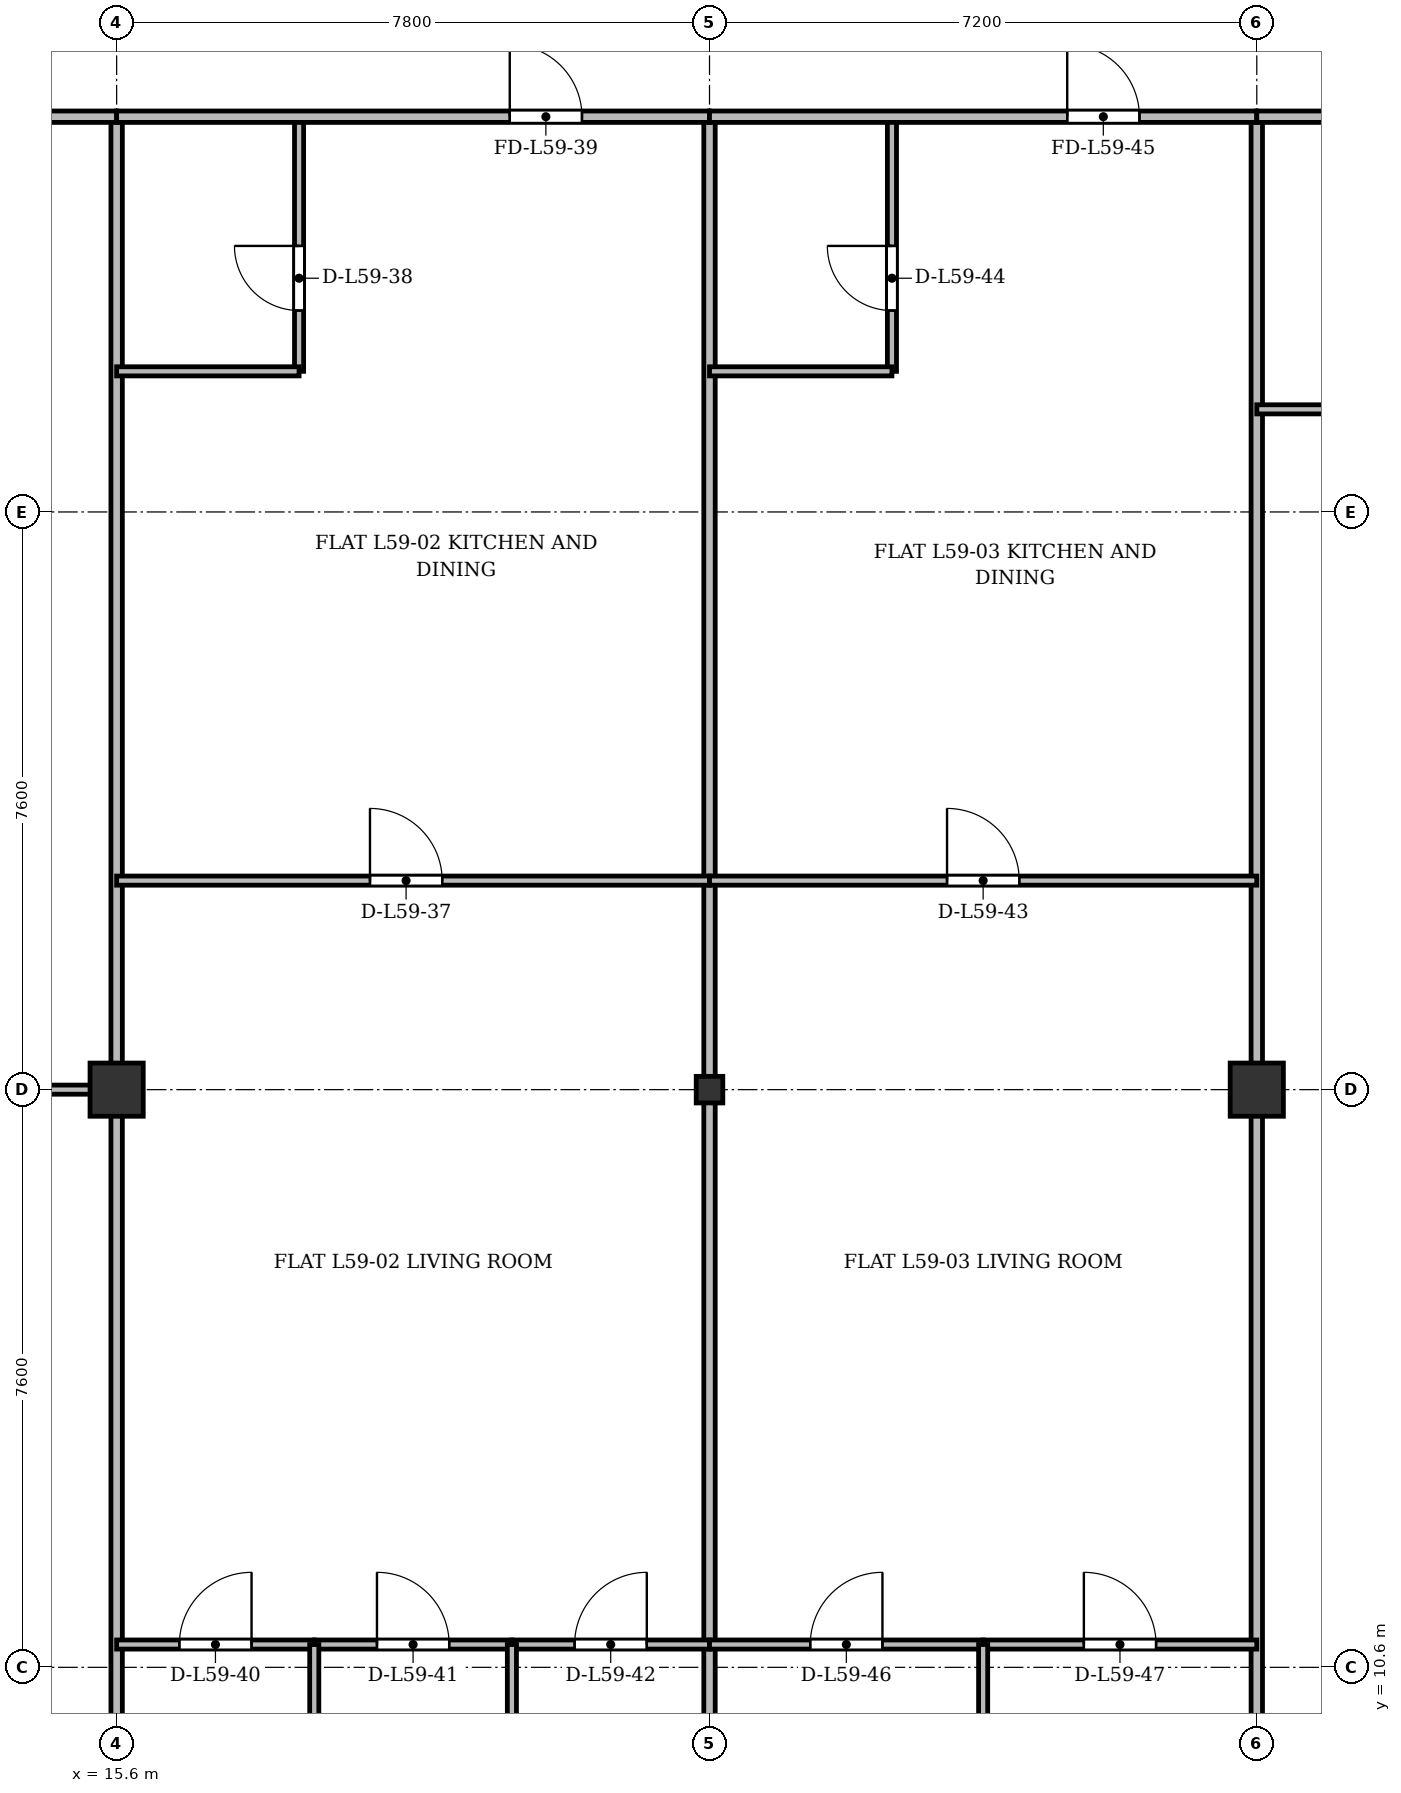
"""IFC4 building model, lengths in metres.
Left out: names, types, materials, properties, quantities, classifications, styles, units other than length and angle.
Written with IfcOpenShell. Run it as: python <this file> out.ifc"""

import sys

from ifc_helpers import new_model, si_unit, direction, frame, frame_2d, origin, origin_2d, place, context, subcontext, project, spatial, rectangle, i_section, extrude, source, transform, mapped, element, fill, save


model = new_model("IFC4")
c1 = context("Model", 3, precision=1e-05, world=origin(), true_north=direction((0.0, 1.0)))
c2 = subcontext(c1, "Body", "Model", "MODEL_VIEW")
j1 = project(units=[si_unit("LENGTHUNIT", "METRE"), si_unit("PLANEANGLEUNIT", "RADIAN")], contexts=[c1])
p1 = place(None, origin())
s1 = spatial("IfcSite", under=j1, at=p1, CompositionType="ELEMENT")
p2 = place(p1, origin())
s2 = spatial("IfcBuilding", under=s1, at=p2, CompositionType="ELEMENT")
p3 = place(p2, frame((0.0, 0.0, 226.5)))
s3 = spatial("IfcBuildingStorey", under=s2, at=p3, CompositionType="ELEMENT", Elevation=226.5)
m1 = source(origin(), c2, "Body", "SweptSolid", [
    extrude(rectangle(XDim=0.7, YDim=0.7, at=origin_2d()), origin(), (0.0, 0.0, 1.0), 3.6),
])
p4 = place(p3, frame((15.6, 18.2, 0.0), z_axis=(0.0, 0.0, 1.0), x_axis=(1.0, 0.0, 0.0)))
e1 = element("IfcColumn", 1, at=p4, inside=s3, PredefinedType="COLUMN", context=c2, shape_type="MappedRepresentation", body=[
    mapped(m1, transform((0.0, 0.0, 0.0), x_axis=(1.0, 0.0, 0.0), y_axis=(0.0, 1.0, 0.0), z_axis=(0.0, 0.0, 1.0), scale=1.0)),
])
m2 = source(origin(), c2, "Body", "SweptSolid", [
    extrude(i_section(OverallWidth=0.35, OverallDepth=0.35, WebThickness=0.018, FlangeThickness=0.028, at=origin_2d()), origin(), (0.0, 0.0, 1.0), 3.6),
])
p5 = place(p3, frame((23.4, 18.2, 0.0), z_axis=(0.0, 0.0, 1.0), x_axis=(1.0, 0.0, 0.0)))
e2 = element("IfcColumn", 2, at=p5, inside=s3, PredefinedType="COLUMN", context=c2, shape_type="MappedRepresentation", body=[
    mapped(m2, transform((0.0, 0.0, 0.0), x_axis=(1.0, 0.0, 0.0), y_axis=(0.0, 1.0, 0.0), z_axis=(0.0, 0.0, 1.0), scale=1.0)),
])
p6 = place(p3, frame((30.6, 18.2, 0.0), z_axis=(0.0, 0.0, 1.0), x_axis=(1.0, 0.0, 0.0)))
e3 = element("IfcColumn", 3, at=p6, inside=s3, PredefinedType="COLUMN", context=c2, shape_type="MappedRepresentation", body=[
    mapped(m1, transform((0.0, 0.0, 0.0), x_axis=(1.0, 0.0, 0.0), y_axis=(0.0, 1.0, 0.0), z_axis=(0.0, 0.0, 1.0), scale=1.0)),
])
for number, where, z_axis, x_axis in (
    (4, (15.6, 3.625, 0.0), (0.0, 0.0, 1.0), (0.0, 1.0, 0.0)),
    (5, (23.4, 3.625, 0.0), (0.0, 0.0, 1.0), (0.0, 1.0, 0.0)),
    (6, (30.6, 3.625, 0.0), (0.0, 0.0, 1.0), (0.0, 1.0, 0.0)),
):
    element("IfcWall", number, at=place(p3, frame(where, z_axis=z_axis, x_axis=x_axis)), inside=s3, PredefinedType="PARTITIONING", context=c2, shape_type="SweptSolid", body=[
        extrude(rectangle(XDim=27.375, YDim=0.15, at=frame_2d((13.688, 0.0))), origin(), (0.0, 0.0, 1.0), 2.86),
    ])
p7 = place(p3, frame((8.24, 18.2, 0.0), z_axis=(0.0, 0.0, 1.0), x_axis=(1.0, 0.0, 0.0)))
e7 = element("IfcWall", 7, at=p7, inside=s3, PredefinedType="PARTITIONING", context=c2, shape_type="SweptSolid", body=[
    extrude(rectangle(XDim=7.36, YDim=0.12, at=frame_2d((3.68, 0.0))), origin(), (0.0, 0.0, 1.0), 2.91),
])
p8 = place(p7, frame((3.114, 0.0, 0.0)))
e8 = element("IfcOpeningElement", 8, at=p8, cuts=e7, PredefinedType="OPENING", context=c2, shape_type="SweptSolid", body=[
    extrude(rectangle(XDim=0.95, YDim=2.15, at=frame_2d((0.475, 1.075))), frame((0.0, 0.07, 0.0), z_axis=(0.0, -1.0, 0.0), x_axis=(1.0, 0.0, 0.0)), (0.0, 0.0, 1.0), 0.14),
])
p9 = place(p3, frame((8.225, 31.0, 0.0), z_axis=(0.0, 0.0, 1.0), x_axis=(1.0, 0.0, 0.0)))
e9 = element("IfcWall", 9, at=p9, inside=s3, PredefinedType="PARTITIONING", context=c2, shape_type="SweptSolid", body=[
    extrude(rectangle(XDim=7.375, YDim=0.15, at=frame_2d((3.688, 0.0))), origin(), (0.0, 0.0, 1.0), 2.86),
])
p10 = place(p9, frame((4.877, 0.0, 0.0)))
e10 = element("IfcOpeningElement", 10, at=p10, cuts=e9, PredefinedType="OPENING", context=c2, shape_type="SweptSolid", body=[
    extrude(rectangle(XDim=0.95, YDim=2.15, at=frame_2d((0.475, 1.075))), frame((0.0, 0.085, 0.0), z_axis=(0.0, -1.0, 0.0), x_axis=(1.0, 0.0, 0.0)), (0.0, 0.0, 1.0), 0.17),
])
p11 = place(p3, frame((15.6, 20.95, 0.0), z_axis=(0.0, 0.0, 1.0), x_axis=(1.0, 0.0, 0.0)))
e11 = element("IfcWall", 11, at=p11, inside=s3, PredefinedType="PARTITIONING", context=c2, shape_type="SweptSolid", body=[
    extrude(rectangle(XDim=7.8, YDim=0.12, at=frame_2d((3.9, 0.0))), origin(), (0.0, 0.0, 1.0), 2.86),
])
p12 = place(p11, frame((3.333, 0.0, 0.0)))
e12 = element("IfcOpeningElement", 12, at=p12, cuts=e11, PredefinedType="OPENING", context=c2, shape_type="SweptSolid", body=[
    extrude(rectangle(XDim=0.95, YDim=2.15, at=frame_2d((0.475, 1.075))), frame((0.0, 0.07, 0.0), z_axis=(0.0, -1.0, 0.0), x_axis=(1.0, 0.0, 0.0)), (0.0, 0.0, 1.0), 0.14),
])
p13 = place(p3, frame((18.0, 27.65, 0.0), z_axis=(0.0, 0.0, 1.0), x_axis=(0.0, 1.0, 0.0)))
e13 = element("IfcWall", 13, at=p13, inside=s3, PredefinedType="PARTITIONING", context=c2, shape_type="SweptSolid", body=[
    extrude(rectangle(XDim=3.35, YDim=0.12, at=frame_2d((1.675, 0.0))), origin(), (0.0, 0.0, 1.0), 3.36),
])
p14 = place(p13, frame((0.8, 0.0, 0.0)))
e14 = element("IfcOpeningElement", 14, at=p14, cuts=e13, PredefinedType="OPENING", context=c2, shape_type="SweptSolid", body=[
    extrude(rectangle(XDim=0.85, YDim=2.1, at=frame_2d((0.425, 1.05))), frame((0.0, 0.07, 0.0), z_axis=(0.0, -1.0, 0.0), x_axis=(1.0, 0.0, 0.0)), (0.0, 0.0, 1.0), 0.14),
])
p15 = place(p3, frame((15.6, 27.65, 0.0), z_axis=(0.0, 0.0, 1.0), x_axis=(1.0, 0.0, 0.0)))
e15 = element("IfcWall", 15, at=p15, inside=s3, PredefinedType="PARTITIONING", context=c2, shape_type="SweptSolid", body=[
    extrude(rectangle(XDim=2.4, YDim=0.12, at=frame_2d((1.2, 0.0))), origin(), (0.0, 0.0, 1.0), 2.86),
])
p16 = place(p3, frame((15.6, 31.0, 0.0), z_axis=(0.0, 0.0, 1.0), x_axis=(1.0, 0.0, 0.0)))
e16 = element("IfcWall", 16, at=p16, inside=s3, PredefinedType="PARTITIONING", context=c2, shape_type="SweptSolid", body=[
    extrude(rectangle(XDim=7.8, YDim=0.15, at=frame_2d((3.9, 0.0))), origin(), (0.0, 0.0, 1.0), 2.86),
])
p17 = place(p16, frame((5.172, 0.0, 0.0)))
e17 = element("IfcOpeningElement", 17, at=p17, cuts=e16, PredefinedType="OPENING", context=c2, shape_type="SweptSolid", body=[
    extrude(rectangle(XDim=0.95, YDim=2.15, at=frame_2d((0.475, 1.075))), frame((0.0, 0.085, 0.0), z_axis=(0.0, -1.0, 0.0), x_axis=(1.0, 0.0, 0.0)), (0.0, 0.0, 1.0), 0.17),
])
p18 = place(p3, frame((15.6, 10.9, 0.0), z_axis=(0.0, 0.0, 1.0), x_axis=(1.0, 0.0, 0.0)))
e18 = element("IfcWall", 18, at=p18, inside=s3, PredefinedType="PARTITIONING", context=c2, shape_type="SweptSolid", body=[
    extrude(rectangle(XDim=2.6, YDim=0.12, at=frame_2d((1.3, 0.0))), origin(), (0.0, 0.0, 1.0), 2.86),
])
p19 = place(p18, frame((0.825, 0.0, 0.0)))
e19 = element("IfcOpeningElement", 19, at=p19, cuts=e18, PredefinedType="OPENING", context=c2, shape_type="SweptSolid", body=[
    extrude(rectangle(XDim=0.95, YDim=2.15, at=frame_2d((0.475, 1.075))), frame((0.0, 0.07, 0.0), z_axis=(0.0, -1.0, 0.0), x_axis=(1.0, 0.0, 0.0)), (0.0, 0.0, 1.0), 0.14),
])
p20 = place(p3, frame((18.2, 10.9, 0.0), z_axis=(0.0, 0.0, 1.0), x_axis=(1.0, 0.0, 0.0)))
e20 = element("IfcWall", 20, at=p20, inside=s3, PredefinedType="PARTITIONING", context=c2, shape_type="SweptSolid", body=[
    extrude(rectangle(XDim=2.6, YDim=0.12, at=frame_2d((1.3, 0.0))), origin(), (0.0, 0.0, 1.0), 3.06),
])
p21 = place(p20, frame((0.825, 0.0, 0.0)))
e21 = element("IfcOpeningElement", 21, at=p21, cuts=e20, PredefinedType="OPENING", context=c2, shape_type="SweptSolid", body=[
    extrude(rectangle(XDim=0.95, YDim=2.15, at=frame_2d((0.475, 1.075))), frame((0.0, 0.07, 0.0), z_axis=(0.0, -1.0, 0.0), x_axis=(1.0, 0.0, 0.0)), (0.0, 0.0, 1.0), 0.14),
])
p22 = place(p3, frame((18.2, 3.625, 0.0), z_axis=(0.0, 0.0, 1.0), x_axis=(0.0, 1.0, 0.0)))
e22 = element("IfcWall", 22, at=p22, inside=s3, PredefinedType="PARTITIONING", context=c2, shape_type="SweptSolid", body=[
    extrude(rectangle(XDim=7.275, YDim=0.12, at=frame_2d((3.637, 0.0))), origin(), (0.0, 0.0, 1.0), 2.91),
])
p23 = place(p3, frame((20.8, 10.9, 0.0), z_axis=(0.0, 0.0, 1.0), x_axis=(1.0, 0.0, 0.0)))
e23 = element("IfcWall", 23, at=p23, inside=s3, PredefinedType="PARTITIONING", context=c2, shape_type="SweptSolid", body=[
    extrude(rectangle(XDim=2.6, YDim=0.12, at=frame_2d((1.3, 0.0))), origin(), (0.0, 0.0, 1.0), 2.86),
])
p24 = place(p23, frame((0.825, 0.0, 0.0)))
e24 = element("IfcOpeningElement", 24, at=p24, cuts=e23, PredefinedType="OPENING", context=c2, shape_type="SweptSolid", body=[
    extrude(rectangle(XDim=0.95, YDim=2.15, at=frame_2d((0.475, 1.075))), frame((0.0, 0.07, 0.0), z_axis=(0.0, -1.0, 0.0), x_axis=(1.0, 0.0, 0.0)), (0.0, 0.0, 1.0), 0.14),
])
p25 = place(p3, frame((20.8, 3.625, 0.0), z_axis=(0.0, 0.0, 1.0), x_axis=(0.0, 1.0, 0.0)))
e25 = element("IfcWall", 25, at=p25, inside=s3, PredefinedType="PARTITIONING", context=c2, shape_type="SweptSolid", body=[
    extrude(rectangle(XDim=7.275, YDim=0.12, at=frame_2d((3.637, 0.0))), origin(), (0.0, 0.0, 1.0), 2.91),
])
p26 = place(p3, frame((23.4, 20.95, 0.0), z_axis=(0.0, 0.0, 1.0), x_axis=(1.0, 0.0, 0.0)))
e26 = element("IfcWall", 26, at=p26, inside=s3, PredefinedType="PARTITIONING", context=c2, shape_type="SweptSolid", body=[
    extrude(rectangle(XDim=7.2, YDim=0.12, at=frame_2d((3.6, 0.0))), origin(), (0.0, 0.0, 1.0), 2.86),
])
p27 = place(p26, frame((3.125, 0.0, 0.0)))
e27 = element("IfcOpeningElement", 27, at=p27, cuts=e26, PredefinedType="OPENING", context=c2, shape_type="SweptSolid", body=[
    extrude(rectangle(XDim=0.95, YDim=2.15, at=frame_2d((0.475, 1.075))), frame((0.0, 0.07, 0.0), z_axis=(0.0, -1.0, 0.0), x_axis=(1.0, 0.0, 0.0)), (0.0, 0.0, 1.0), 0.14),
])
p28 = place(p3, frame((25.8, 27.65, 0.0), z_axis=(0.0, 0.0, 1.0), x_axis=(0.0, 1.0, 0.0)))
e28 = element("IfcWall", 28, at=p28, inside=s3, PredefinedType="PARTITIONING", context=c2, shape_type="SweptSolid", body=[
    extrude(rectangle(XDim=3.35, YDim=0.12, at=frame_2d((1.675, 0.0))), origin(), (0.0, 0.0, 1.0), 3.36),
])
p29 = place(p28, frame((0.8, 0.0, 0.0)))
e29 = element("IfcOpeningElement", 29, at=p29, cuts=e28, PredefinedType="OPENING", context=c2, shape_type="SweptSolid", body=[
    extrude(rectangle(XDim=0.85, YDim=2.1, at=frame_2d((0.425, 1.05))), frame((0.0, 0.07, 0.0), z_axis=(0.0, -1.0, 0.0), x_axis=(1.0, 0.0, 0.0)), (0.0, 0.0, 1.0), 0.14),
])
p30 = place(p3, frame((23.4, 27.65, 0.0), z_axis=(0.0, 0.0, 1.0), x_axis=(1.0, 0.0, 0.0)))
e30 = element("IfcWall", 30, at=p30, inside=s3, PredefinedType="PARTITIONING", context=c2, shape_type="SweptSolid", body=[
    extrude(rectangle(XDim=2.4, YDim=0.12, at=frame_2d((1.2, 0.0))), origin(), (0.0, 0.0, 1.0), 2.86),
])
p31 = place(p3, frame((23.4, 31.0, 0.0), z_axis=(0.0, 0.0, 1.0), x_axis=(1.0, 0.0, 0.0)))
e31 = element("IfcWall", 31, at=p31, inside=s3, PredefinedType="PARTITIONING", context=c2, shape_type="SweptSolid", body=[
    extrude(rectangle(XDim=7.2, YDim=0.15, at=frame_2d((3.6, 0.0))), origin(), (0.0, 0.0, 1.0), 2.86),
])
p32 = place(p31, frame((4.706, 0.0, 0.0)))
e32 = element("IfcOpeningElement", 32, at=p32, cuts=e31, PredefinedType="OPENING", context=c2, shape_type="SweptSolid", body=[
    extrude(rectangle(XDim=0.95, YDim=2.15, at=frame_2d((0.475, 1.075))), frame((0.0, 0.085, 0.0), z_axis=(0.0, -1.0, 0.0), x_axis=(1.0, 0.0, 0.0)), (0.0, 0.0, 1.0), 0.17),
])
p33 = place(p3, frame((23.4, 10.9, 0.0), z_axis=(0.0, 0.0, 1.0), x_axis=(1.0, 0.0, 0.0)))
e33 = element("IfcWall", 33, at=p33, inside=s3, PredefinedType="PARTITIONING", context=c2, shape_type="SweptSolid", body=[
    extrude(rectangle(XDim=3.6, YDim=0.12, at=frame_2d((1.8, 0.0))), origin(), (0.0, 0.0, 1.0), 2.86),
])
p34 = place(p33, frame((1.325, 0.0, 0.0)))
e34 = element("IfcOpeningElement", 34, at=p34, cuts=e33, PredefinedType="OPENING", context=c2, shape_type="SweptSolid", body=[
    extrude(rectangle(XDim=0.95, YDim=2.15, at=frame_2d((0.475, 1.075))), frame((0.0, 0.07, 0.0), z_axis=(0.0, -1.0, 0.0), x_axis=(1.0, 0.0, 0.0)), (0.0, 0.0, 1.0), 0.14),
])
p35 = place(p3, frame((27.0, 10.9, 0.0), z_axis=(0.0, 0.0, 1.0), x_axis=(1.0, 0.0, 0.0)))
e35 = element("IfcWall", 35, at=p35, inside=s3, PredefinedType="PARTITIONING", context=c2, shape_type="SweptSolid", body=[
    extrude(rectangle(XDim=3.6, YDim=0.12, at=frame_2d((1.8, 0.0))), origin(), (0.0, 0.0, 1.0), 2.86),
])
p36 = place(p35, frame((1.325, 0.0, 0.0)))
e36 = element("IfcOpeningElement", 36, at=p36, cuts=e35, PredefinedType="OPENING", context=c2, shape_type="SweptSolid", body=[
    extrude(rectangle(XDim=0.95, YDim=2.15, at=frame_2d((0.475, 1.075))), frame((0.0, 0.07, 0.0), z_axis=(0.0, -1.0, 0.0), x_axis=(1.0, 0.0, 0.0)), (0.0, 0.0, 1.0), 0.14),
])
p37 = place(p3, frame((27.0, 3.625, 0.0), z_axis=(0.0, 0.0, 1.0), x_axis=(0.0, 1.0, 0.0)))
e37 = element("IfcWall", 37, at=p37, inside=s3, PredefinedType="PARTITIONING", context=c2, shape_type="SweptSolid", body=[
    extrude(rectangle(XDim=7.275, YDim=0.12, at=frame_2d((3.637, 0.0))), origin(), (0.0, 0.0, 1.0), 2.91),
])
p38 = place(p3, frame((30.6, 31.0, 0.0), z_axis=(0.0, 0.0, 1.0), x_axis=(1.0, 0.0, 0.0)))
e38 = element("IfcWall", 38, at=p38, inside=s3, PredefinedType="PARTITIONING", context=c2, shape_type="SweptSolid", body=[
    extrude(rectangle(XDim=6.6, YDim=0.15, at=frame_2d((3.3, 0.0))), origin(), (0.0, 0.0, 1.0), 2.86),
])
p39 = place(p38, frame((2.734, 0.0, 0.0)))
e39 = element("IfcOpeningElement", 39, at=p39, cuts=e38, PredefinedType="OPENING", context=c2, shape_type="SweptSolid", body=[
    extrude(rectangle(XDim=0.95, YDim=2.15, at=frame_2d((0.475, 1.075))), frame((0.0, 0.085, 0.0), z_axis=(0.0, -1.0, 0.0), x_axis=(1.0, 0.0, 0.0)), (0.0, 0.0, 1.0), 0.17),
])
p40 = place(p3, frame((30.6, 27.15, 0.0), z_axis=(0.0, 0.0, 1.0), x_axis=(1.0, 0.0, 0.0)))
e40 = element("IfcWall", 40, at=p40, inside=s3, PredefinedType="PARTITIONING", context=c2, shape_type="SweptSolid", body=[
    extrude(rectangle(XDim=6.6, YDim=0.12, at=frame_2d((3.3, 0.0))), origin(), (0.0, 0.0, 1.0), 2.86),
])
p41 = place(p40, frame((2.734, 0.0, 0.0)))
e41 = element("IfcOpeningElement", 41, at=p41, cuts=e40, PredefinedType="OPENING", context=c2, shape_type="SweptSolid", body=[
    extrude(rectangle(XDim=0.95, YDim=2.15, at=frame_2d((0.475, 1.075))), frame((0.0, 0.07, 0.0), z_axis=(0.0, -1.0, 0.0), x_axis=(1.0, 0.0, 0.0)), (0.0, 0.0, 1.0), 0.14),
])
m3 = source(origin(), c2, "Body", "SweptSolid", [
    extrude(rectangle(XDim=0.95, YDim=2.15, at=frame_2d((0.475, 1.075))), frame((0.0, 0.025, 0.0), z_axis=(0.0, -1.0, 0.0), x_axis=(1.0, 0.0, 0.0)), (0.0, 0.0, 1.0), 0.05),
])
p42 = place(p12, origin())
e42 = element("IfcDoor", 42, at=p42, inside=s3, OperationType="SINGLE_SWING_LEFT", PredefinedType="DOOR", context=c2, shape_type="MappedRepresentation", body=[
    mapped(m3, transform((0.0, 0.0, 0.0), x_axis=(1.0, 0.0, 0.0), y_axis=(0.0, 1.0, 0.0), z_axis=(0.0, 0.0, 1.0), scale=1.0)),
])
fill(e12, e42)
m4 = source(origin(), c2, "Body", "SweptSolid", [
    extrude(rectangle(XDim=0.85, YDim=2.1, at=frame_2d((0.425, 1.05))), frame((0.0, 0.025, 0.0), z_axis=(0.0, -1.0, 0.0), x_axis=(1.0, 0.0, 0.0)), (0.0, 0.0, 1.0), 0.05),
])
p43 = place(p14, origin())
e43 = element("IfcDoor", 43, at=p43, inside=s3, OperationType="SINGLE_SWING_RIGHT", PredefinedType="DOOR", context=c2, shape_type="MappedRepresentation", body=[
    mapped(m4, transform((0.0, 0.0, 0.0), x_axis=(1.0, 0.0, 0.0), y_axis=(0.0, 1.0, 0.0), z_axis=(0.0, 0.0, 1.0), scale=1.0)),
])
fill(e14, e43)
p44 = place(p17, origin())
e44 = element("IfcDoor", 44, at=p44, inside=s3, OperationType="SINGLE_SWING_LEFT", PredefinedType="DOOR", context=c2, shape_type="MappedRepresentation", body=[
    mapped(m3, transform((0.0, 0.0, 0.0), x_axis=(1.0, 0.0, 0.0), y_axis=(0.0, 1.0, 0.0), z_axis=(0.0, 0.0, 1.0), scale=1.0)),
])
fill(e17, e44)
p45 = place(p19, origin())
e45 = element("IfcDoor", 45, at=p45, inside=s3, OperationType="SINGLE_SWING_RIGHT", PredefinedType="DOOR", context=c2, shape_type="MappedRepresentation", body=[
    mapped(m3, transform((0.0, 0.0, 0.0), x_axis=(1.0, 0.0, 0.0), y_axis=(0.0, 1.0, 0.0), z_axis=(0.0, 0.0, 1.0), scale=1.0)),
])
fill(e19, e45)
p46 = place(p21, origin())
e46 = element("IfcDoor", 46, at=p46, inside=s3, OperationType="SINGLE_SWING_LEFT", PredefinedType="DOOR", context=c2, shape_type="MappedRepresentation", body=[
    mapped(m3, transform((0.0, 0.0, 0.0), x_axis=(1.0, 0.0, 0.0), y_axis=(0.0, 1.0, 0.0), z_axis=(0.0, 0.0, 1.0), scale=1.0)),
])
fill(e21, e46)
p47 = place(p24, origin())
e47 = element("IfcDoor", 47, at=p47, inside=s3, OperationType="SINGLE_SWING_RIGHT", PredefinedType="DOOR", context=c2, shape_type="MappedRepresentation", body=[
    mapped(m3, transform((0.0, 0.0, 0.0), x_axis=(1.0, 0.0, 0.0), y_axis=(0.0, 1.0, 0.0), z_axis=(0.0, 0.0, 1.0), scale=1.0)),
])
fill(e24, e47)
p48 = place(p27, origin())
e48 = element("IfcDoor", 48, at=p48, inside=s3, OperationType="SINGLE_SWING_LEFT", PredefinedType="DOOR", context=c2, shape_type="MappedRepresentation", body=[
    mapped(m3, transform((0.0, 0.0, 0.0), x_axis=(1.0, 0.0, 0.0), y_axis=(0.0, 1.0, 0.0), z_axis=(0.0, 0.0, 1.0), scale=1.0)),
])
fill(e27, e48)
p49 = place(p29, origin())
e49 = element("IfcDoor", 49, at=p49, inside=s3, OperationType="SINGLE_SWING_RIGHT", PredefinedType="DOOR", context=c2, shape_type="MappedRepresentation", body=[
    mapped(m4, transform((0.0, 0.0, 0.0), x_axis=(1.0, 0.0, 0.0), y_axis=(0.0, 1.0, 0.0), z_axis=(0.0, 0.0, 1.0), scale=1.0)),
])
fill(e29, e49)
p50 = place(p32, origin())
e50 = element("IfcDoor", 50, at=p50, inside=s3, OperationType="SINGLE_SWING_LEFT", PredefinedType="DOOR", context=c2, shape_type="MappedRepresentation", body=[
    mapped(m3, transform((0.0, 0.0, 0.0), x_axis=(1.0, 0.0, 0.0), y_axis=(0.0, 1.0, 0.0), z_axis=(0.0, 0.0, 1.0), scale=1.0)),
])
fill(e32, e50)
p51 = place(p34, origin())
e51 = element("IfcDoor", 51, at=p51, inside=s3, OperationType="SINGLE_SWING_RIGHT", PredefinedType="DOOR", context=c2, shape_type="MappedRepresentation", body=[
    mapped(m3, transform((0.0, 0.0, 0.0), x_axis=(1.0, 0.0, 0.0), y_axis=(0.0, 1.0, 0.0), z_axis=(0.0, 0.0, 1.0), scale=1.0)),
])
fill(e34, e51)
p52 = place(p36, origin())
e52 = element("IfcDoor", 52, at=p52, inside=s3, OperationType="SINGLE_SWING_LEFT", PredefinedType="DOOR", context=c2, shape_type="MappedRepresentation", body=[
    mapped(m3, transform((0.0, 0.0, 0.0), x_axis=(1.0, 0.0, 0.0), y_axis=(0.0, 1.0, 0.0), z_axis=(0.0, 0.0, 1.0), scale=1.0)),
])
fill(e36, e52)
save(model, sys.argv[1])
